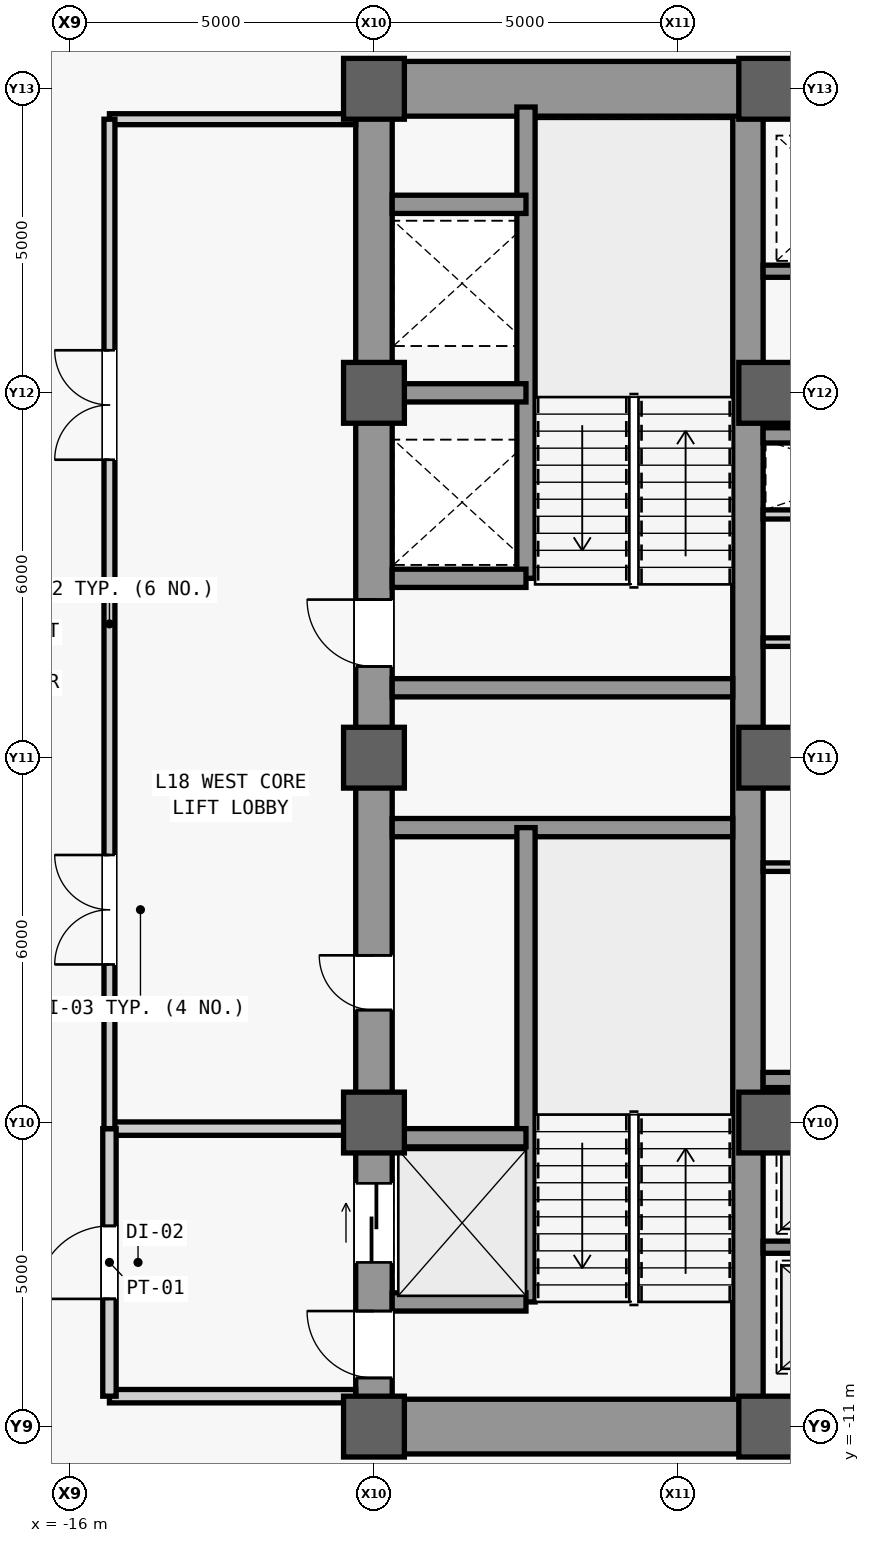
"""IFC4 building model, lengths in metres.
Left out: names, types, materials, properties, quantities, classifications, styles, units other than length and angle.
Written with IfcOpenShell. Run it as: python <this file> out.ifc"""

import sys

from ifc_helpers import new_model, si_unit, direction, frame, frame_2d, origin, origin_2d, place, context, subcontext, project, spatial, rectangle, extrude, source, transform, mapped, element, fill, save


model = new_model("IFC4")
c1 = context("Model", 3, precision=1e-05, world=origin(), true_north=direction((0.0, 1.0)))
c2 = subcontext(c1, "Body", "Model", "MODEL_VIEW")
j1 = project(units=[si_unit("LENGTHUNIT", "METRE"), si_unit("PLANEANGLEUNIT", "RADIAN")], contexts=[c1])
p1 = place(None, origin())
s1 = spatial("IfcSite", under=j1, at=p1, CompositionType="ELEMENT")
p2 = place(p1, origin())
s2 = spatial("IfcBuilding", under=s1, at=p2, CompositionType="ELEMENT")
p3 = place(p2, frame((0.0, 0.0, 83.0)))
s3 = spatial("IfcBuildingStorey", under=s2, at=p3, CompositionType="ELEMENT", Elevation=83.0)
m1 = source(origin(), c2, "Body", "SweptSolid", [
    extrude(rectangle(XDim=22.0, YDim=0.6, at=frame_2d((11.0, 0.0))), origin(), (0.0, 0.0, 1.0), 3.94),
])
p4 = place(p3, frame((-11.0, -11.0, 0.0), z_axis=(0.0, 0.0, 1.0), x_axis=(0.0, 1.0, 0.0)))
e1 = element("IfcWall", 1, at=p4, inside=s3, PredefinedType="SHEAR", context=c2, shape_type="MappedRepresentation", body=[
    mapped(m1, transform((0.0, 0.0, 0.0), scale=1.0)),
])
m2 = source(origin(), c2, "Body", "SweptSolid", [
    extrude(rectangle(XDim=1.1, YDim=2.2, at=frame_2d((0.55, 1.1))), frame((0.0, 0.31, 0.0), z_axis=(0.0, -1.0, 0.0), x_axis=(1.0, 0.0, 0.0)), (0.0, 0.0, 1.0), 0.62),
])
p5 = place(p4, frame((0.8, 0.0, 0.0)))
e2 = element("IfcOpeningElement", 2, at=p5, cuts=e1, PredefinedType="OPENING", context=c2, shape_type="MappedRepresentation", body=[
    mapped(m2, transform((0.0, 0.0, 0.0), scale=1.0)),
])
p6 = place(p4, frame((12.5, 0.0, 0.0)))
e3 = element("IfcOpeningElement", 3, at=p6, cuts=e1, PredefinedType="OPENING", context=c2, shape_type="MappedRepresentation", body=[
    mapped(m2, transform((0.0, 0.0, 0.0), scale=1.0)),
])
m3 = source(origin(), c2, "Body", "SweptSolid", [
    extrude(rectangle(XDim=0.9, YDim=2.15, at=frame_2d((0.45, 1.075))), frame((0.0, 0.31, 0.0), z_axis=(0.0, -1.0, 0.0), x_axis=(1.0, 0.0, 0.0)), (0.0, 0.0, 1.0), 0.62),
])
p7 = place(p4, frame((6.85, 0.0, 0.0)))
e4 = element("IfcOpeningElement", 4, at=p7, cuts=e1, PredefinedType="OPENING", context=c2, shape_type="MappedRepresentation", body=[
    mapped(m3, transform((0.0, 0.0, 0.0), scale=1.0)),
])
m4 = source(origin(), c2, "Body", "SweptSolid", [
    extrude(rectangle(XDim=1.3, YDim=2.3, at=frame_2d((0.65, 1.15))), frame((0.0, 0.31, 0.0), z_axis=(0.0, -1.0, 0.0), x_axis=(1.0, 0.0, 0.0)), (0.0, 0.0, 1.0), 0.62),
])
p8 = place(p4, frame((2.7, 0.0, 0.0)))
e5 = element("IfcOpeningElement", 5, at=p8, cuts=e1, PredefinedType="OPENING", context=c2, shape_type="MappedRepresentation", body=[
    mapped(m4, transform((0.0, 0.0, 0.0), scale=1.0)),
])
m5 = source(origin(), c2, "Body", "SweptSolid", [
    extrude(rectangle(XDim=21.4, YDim=0.5, at=frame_2d((10.7, 0.0))), origin(), (0.0, 0.0, 1.0), 3.94),
])
p9 = place(p3, frame((-4.85, -10.7, 0.0), z_axis=(0.0, 0.0, 1.0), x_axis=(0.0, 1.0, 0.0)))
e6 = element("IfcWall", 6, at=p9, inside=s3, PredefinedType="SHEAR", context=c2, shape_type="MappedRepresentation", body=[
    mapped(m5, transform((0.0, 0.0, 0.0), scale=1.0)),
])
m6 = source(origin(), c2, "Body", "SweptSolid", [
    extrude(rectangle(XDim=5.85, YDim=0.9, at=frame_2d((2.925, 0.0))), origin(), (0.0, 0.0, 1.0), 3.94),
])
for number, where, z_axis, x_axis in (
    (7, (-10.7, -11.0, 0.0), (0.0, 0.0, 1.0), (1.0, 0.0, 0.0)),
    (8, (-10.7, 11.0, 0.0), (0.0, 0.0, 1.0), (1.0, 0.0, 0.0)),
):
    element("IfcWall", number, at=place(p3, frame(where, z_axis=z_axis, x_axis=x_axis)), inside=s3, PredefinedType="SHEAR", context=c2, shape_type="MappedRepresentation", body=[
        mapped(m6, transform((0.0, 0.0, 0.0), scale=1.0)),
    ])
m7 = source(origin(), c2, "Body", "SweptSolid", [
    extrude(rectangle(XDim=5.6, YDim=0.3, at=frame_2d((2.8, 0.0))), origin(), (0.0, 0.0, 1.0), 3.94),
])
for number, where, z_axis, x_axis in (
    (9, (-10.7, -1.15, 0.0), (0.0, 0.0, 1.0), (1.0, 0.0, 0.0)),
    (10, (-10.7, 1.15, 0.0), (0.0, 0.0, 1.0), (1.0, 0.0, 0.0)),
):
    element("IfcWall", number, at=place(p3, frame(where, z_axis=z_axis, x_axis=x_axis)), inside=s3, PredefinedType="SHEAR", context=c2, shape_type="MappedRepresentation", body=[
        mapped(m7, transform((0.0, 0.0, 0.0), scale=1.0)),
    ])
m8 = source(origin(), c2, "Body", "SweptSolid", [
    extrude(rectangle(XDim=9.2, YDim=0.5, at=frame_2d((4.6, 0.0))), origin(), (0.0, 0.0, 1.0), 3.94),
])
p10 = place(p3, frame((-4.6, -11.0, 0.0), z_axis=(0.0, 0.0, 1.0), x_axis=(1.0, 0.0, 0.0)))
e11 = element("IfcWall", 11, at=p10, inside=s3, PredefinedType="SHEAR", context=c2, shape_type="MappedRepresentation", body=[
    mapped(m8, transform((0.0, 0.0, 0.0), scale=1.0)),
])
m9 = source(origin(), c2, "Body", "SweptSolid", [
    extrude(rectangle(XDim=1.8, YDim=2.25, at=frame_2d((0.9, 1.125))), frame((0.0, 0.26, 0.0), z_axis=(0.0, -1.0, 0.0), x_axis=(1.0, 0.0, 0.0)), (0.0, 0.0, 1.0), 0.52),
])
p11 = place(p10, frame((3.7, 0.0, 0.0)))
e12 = element("IfcOpeningElement", 12, at=p11, cuts=e11, PredefinedType="OPENING", context=c2, shape_type="MappedRepresentation", body=[
    mapped(m9, transform((0.0, 0.0, 0.0), scale=1.0)),
])
p12 = place(p3, frame((-4.6, 11.0, 0.0), z_axis=(0.0, 0.0, 1.0), x_axis=(1.0, 0.0, 0.0)))
e13 = element("IfcWall", 13, at=p12, inside=s3, PredefinedType="SHEAR", context=c2, shape_type="MappedRepresentation", body=[
    mapped(m8, transform((0.0, 0.0, 0.0), scale=1.0)),
])
p13 = place(p12, frame((3.7, 0.0, 0.0)))
e14 = element("IfcOpeningElement", 14, at=p13, cuts=e13, PredefinedType="OPENING", context=c2, shape_type="MappedRepresentation", body=[
    mapped(m9, transform((0.0, 0.0, 0.0), scale=1.0)),
])
m10 = source(origin(), c2, "Body", "SweptSolid", [
    extrude(rectangle(XDim=1.0, YDim=1.0, at=origin_2d()), origin(), (0.0, 0.0, 1.0), 4.2),
])
for number, where, z_axis, x_axis in (
    (15, (-11.0, -11.0, 0.0), (0.0, 0.0, 1.0), (1.0, 0.0, 0.0)),
    (16, (-11.0, -6.0, 0.0), (0.0, 0.0, 1.0), (1.0, 0.0, 0.0)),
    (17, (-11.0, 0.0, 0.0), (0.0, 0.0, 1.0), (1.0, 0.0, 0.0)),
    (18, (-11.0, 6.0, 0.0), (0.0, 0.0, 1.0), (1.0, 0.0, 0.0)),
    (19, (-11.0, 11.0, 0.0), (0.0, 0.0, 1.0), (1.0, 0.0, 0.0)),
    (20, (-4.5, -11.0, 0.0), (0.0, 0.0, 1.0), (1.0, 0.0, 0.0)),
    (21, (-4.5, -6.0, 0.0), (0.0, 0.0, 1.0), (1.0, 0.0, 0.0)),
    (22, (-4.5, 0.0, 0.0), (0.0, 0.0, 1.0), (1.0, 0.0, 0.0)),
    (23, (-4.5, 6.0, 0.0), (0.0, 0.0, 1.0), (1.0, 0.0, 0.0)),
    (24, (-4.5, 11.0, 0.0), (0.0, 0.0, 1.0), (1.0, 0.0, 0.0)),
):
    element("IfcColumn", number, at=place(p3, frame(where, z_axis=z_axis, x_axis=x_axis)), inside=s3, PredefinedType="COLUMN", context=c2, shape_type="MappedRepresentation", body=[
        mapped(m10, transform((0.0, 0.0, 0.0), scale=1.0)),
    ])
m11 = source(origin(), c2, "Body", "SweptSolid", [
    extrude(rectangle(XDim=7.8, YDim=0.3, at=frame_2d((3.9, 0.0))), origin(), (0.0, 0.0, 1.0), 3.94),
])
p14 = place(p3, frame((-8.5, -8.95, 0.0), z_axis=(0.0, 0.0, 1.0), x_axis=(0.0, 1.0, 0.0)))
e25 = element("IfcWall", 25, at=p14, inside=s3, PredefinedType="SHEAR", context=c2, shape_type="MappedRepresentation", body=[
    mapped(m11, transform((0.0, 0.0, 0.0), scale=1.0)),
])
m12 = source(origin(), c2, "Body", "SweptSolid", [
    extrude(rectangle(XDim=2.2, YDim=0.3, at=frame_2d((1.1, 0.0))), origin(), (0.0, 0.0, 1.0), 3.94),
])
for number, where, z_axis, x_axis in (
    (26, (-10.7, -8.95, 0.0), (0.0, 0.0, 1.0), (1.0, 0.0, 0.0)),
    (27, (-10.7, -6.25, 0.0), (0.0, 0.0, 1.0), (1.0, 0.0, 0.0)),
):
    element("IfcWall", number, at=place(p3, frame(where, z_axis=z_axis, x_axis=x_axis)), inside=s3, PredefinedType="SHEAR", context=c2, shape_type="MappedRepresentation", body=[
        mapped(m12, transform((0.0, 0.0, 0.0), scale=1.0)),
    ])
m13 = source(origin(), c2, "Body", "SweptSolid", [
    extrude(rectangle(XDim=7.75, YDim=0.3, at=frame_2d((3.875, 0.0))), origin(), (0.0, 0.0, 1.0), 3.94),
])
p15 = place(p3, frame((-8.5, 2.95, 0.0), z_axis=(0.0, 0.0, 1.0), x_axis=(0.0, 1.0, 0.0)))
e28 = element("IfcWall", 28, at=p15, inside=s3, PredefinedType="SHEAR", context=c2, shape_type="MappedRepresentation", body=[
    mapped(m13, transform((0.0, 0.0, 0.0), scale=1.0)),
])
for number, where, z_axis, x_axis in (
    (29, (-10.7, 2.95, 0.0), (0.0, 0.0, 1.0), (1.0, 0.0, 0.0)),
    (30, (-10.7, 6.0, 0.0), (0.0, 0.0, 1.0), (1.0, 0.0, 0.0)),
    (31, (-10.7, 9.1, 0.0), (0.0, 0.0, 1.0), (1.0, 0.0, 0.0)),
):
    element("IfcWall", number, at=place(p3, frame(where, z_axis=z_axis, x_axis=x_axis)), inside=s3, PredefinedType="SHEAR", context=c2, shape_type="MappedRepresentation", body=[
        mapped(m12, transform((0.0, 0.0, 0.0), scale=1.0)),
    ])
m14 = source(origin(), c2, "Body", "SweptSolid", [
    extrude(rectangle(XDim=4.05, YDim=0.22, at=frame_2d((2.025, 0.0))), origin(), (0.0, 0.0, 1.0), 3.94),
])
p16 = place(p3, frame((-15.35, -10.5, 0.0), z_axis=(0.0, 0.0, 1.0), x_axis=(1.0, 0.0, 0.0)))
e32 = element("IfcWall", 32, at=p16, inside=s3, PredefinedType="PARTITIONING", context=c2, shape_type="MappedRepresentation", body=[
    mapped(m14, transform((0.0, 0.0, 0.0), scale=1.0)),
])
m15 = source(origin(), c2, "Body", "SweptSolid", [
    extrude(rectangle(XDim=4.05, YDim=0.22, at=frame_2d((2.025, 0.0))), origin(), (0.0, 0.0, 1.0), 3.085),
])
p17 = place(p3, frame((-15.35, -6.1, 0.0), z_axis=(0.0, 0.0, 1.0), x_axis=(1.0, 0.0, 0.0)))
e33 = element("IfcWall", 33, at=p17, inside=s3, PredefinedType="PARTITIONING", context=c2, shape_type="MappedRepresentation", body=[
    mapped(m15, transform((0.0, 0.0, 0.0), scale=1.0)),
])
m16 = source(origin(), c2, "Body", "SweptSolid", [
    extrude(rectangle(XDim=4.4, YDim=0.22, at=frame_2d((2.2, 0.0))), origin(), (0.0, 0.0, 1.0), 3.94),
])
p18 = place(p3, frame((-15.35, -10.5, 0.0), z_axis=(0.0, 0.0, 1.0), x_axis=(0.0, 1.0, 0.0)))
e34 = element("IfcWall", 34, at=p18, inside=s3, PredefinedType="PARTITIONING", context=c2, shape_type="MappedRepresentation", body=[
    mapped(m16, transform((0.0, 0.0, 0.0), scale=1.0)),
])
m17 = source(origin(), c2, "Body", "SweptSolid", [
    extrude(rectangle(XDim=1.2, YDim=2.2, at=frame_2d((0.6, 1.1))), frame((0.0, 0.12, 0.0), z_axis=(0.0, -1.0, 0.0), x_axis=(1.0, 0.0, 0.0)), (0.0, 0.0, 1.0), 0.24),
])
p19 = place(p18, frame((1.6, 0.0, 0.0)))
e35 = element("IfcOpeningElement", 35, at=p19, cuts=e34, PredefinedType="OPENING", context=c2, shape_type="MappedRepresentation", body=[
    mapped(m17, transform((0.0, 0.0, 0.0), scale=1.0)),
])
m18 = source(origin(), c2, "Body", "SweptSolid", [
    extrude(rectangle(XDim=4.05, YDim=0.18, at=frame_2d((2.025, 0.0))), origin(), (0.0, 0.0, 1.0), 3.94),
])
p20 = place(p3, frame((-15.35, 10.5, 0.0), z_axis=(0.0, 0.0, 1.0), x_axis=(1.0, 0.0, 0.0)))
e36 = element("IfcWall", 36, at=p20, inside=s3, PredefinedType="PARTITIONING", context=c2, shape_type="MappedRepresentation", body=[
    mapped(m18, transform((0.0, 0.0, 0.0), scale=1.0)),
])
m19 = source(origin(), c2, "Body", "SweptSolid", [
    extrude(rectangle(XDim=16.6, YDim=0.18, at=frame_2d((8.3, 0.0))), origin(), (0.0, 0.0, 1.0), 3.94),
])
p21 = place(p3, frame((-15.35, -6.1, 0.0), z_axis=(0.0, 0.0, 1.0), x_axis=(0.0, 1.0, 0.0)))
e37 = element("IfcWall", 37, at=p21, inside=s3, PredefinedType="PARTITIONING", context=c2, shape_type="MappedRepresentation", body=[
    mapped(m19, transform((0.0, 0.0, 0.0), scale=1.0)),
])
m20 = source(origin(), c2, "Body", "SweptSolid", [
    extrude(rectangle(XDim=1.8, YDim=2.25, at=frame_2d((0.9, 1.125))), frame((0.0, 0.1, 0.0), z_axis=(0.0, -1.0, 0.0), x_axis=(1.0, 0.0, 0.0)), (0.0, 0.0, 1.0), 0.2),
])
p22 = place(p21, frame((2.7, 0.0, 0.0)))
e38 = element("IfcOpeningElement", 38, at=p22, cuts=e37, PredefinedType="OPENING", context=c2, shape_type="MappedRepresentation", body=[
    mapped(m20, transform((0.0, 0.0, 0.0), scale=1.0)),
])
p23 = place(p21, frame((11.0, 0.0, 0.0)))
e39 = element("IfcOpeningElement", 39, at=p23, cuts=e37, PredefinedType="OPENING", context=c2, shape_type="MappedRepresentation", body=[
    mapped(m20, transform((0.0, 0.0, 0.0), scale=1.0)),
])
m21 = source(origin(), c2, "Body", "SweptSolid", [
    extrude(rectangle(XDim=3.45, YDim=0.15, at=frame_2d((1.725, 0.0))), origin(), (0.0, 0.0, 1.0), 3.94),
])
p24 = place(p3, frame((-4.6, 4.0, 0.0), z_axis=(0.0, 0.0, 1.0), x_axis=(1.0, 0.0, 0.0)))
e40 = element("IfcWall", 40, at=p24, inside=s3, PredefinedType="PARTITIONING", context=c2, shape_type="MappedRepresentation", body=[
    mapped(m21, transform((0.0, 0.0, 0.0), scale=1.0)),
])
m22 = source(origin(), c2, "Body", "SweptSolid", [
    extrude(rectangle(XDim=2.45, YDim=0.2, at=frame_2d((1.225, 0.0))), origin(), (0.0, 0.0, 1.0), 3.94),
])
p25 = place(p3, frame((-4.6, -8.05, 0.0), z_axis=(0.0, 0.0, 1.0), x_axis=(1.0, 0.0, 0.0)))
e41 = element("IfcWall", 41, at=p25, inside=s3, PredefinedType="SHEAR", context=c2, shape_type="MappedRepresentation", body=[
    mapped(m22, transform((0.0, 0.0, 0.0), scale=1.0)),
])
m23 = source(origin(), c2, "Body", "SweptSolid", [
    extrude(rectangle(XDim=9.2, YDim=0.25, at=frame_2d((4.6, 0.0))), origin(), (0.0, 0.0, 1.0), 3.94),
])
p26 = place(p3, frame((-4.6, -5.3, 0.0), z_axis=(0.0, 0.0, 1.0), x_axis=(1.0, 0.0, 0.0)))
e42 = element("IfcWall", 42, at=p26, inside=s3, PredefinedType="SHEAR", context=c2, shape_type="MappedRepresentation", body=[
    mapped(m23, transform((0.0, 0.0, 0.0), scale=1.0)),
])
m24 = source(origin(), c2, "Body", "SweptSolid", [
    extrude(rectangle(XDim=1.05, YDim=2.2, at=frame_2d((0.525, 1.1))), frame((0.0, 0.135, 0.0), z_axis=(0.0, -1.0, 0.0), x_axis=(1.0, 0.0, 0.0)), (0.0, 0.0, 1.0), 0.27),
])
p27 = place(p26, frame((4.075, 0.0, 0.0)))
e43 = element("IfcOpeningElement", 43, at=p27, cuts=e42, PredefinedType="OPENING", context=c2, shape_type="MappedRepresentation", body=[
    mapped(m24, transform((0.0, 0.0, 0.0), scale=1.0)),
])
p28 = place(p3, frame((-4.6, 8.0, 0.0), z_axis=(0.0, 0.0, 1.0), x_axis=(1.0, 0.0, 0.0)))
e44 = element("IfcWall", 44, at=p28, inside=s3, PredefinedType="SHEAR", context=c2, shape_type="MappedRepresentation", body=[
    mapped(m22, transform((0.0, 0.0, 0.0), scale=1.0)),
])
p29 = place(p3, frame((-4.6, 5.3, 0.0), z_axis=(0.0, 0.0, 1.0), x_axis=(1.0, 0.0, 0.0)))
e45 = element("IfcWall", 45, at=p29, inside=s3, PredefinedType="SHEAR", context=c2, shape_type="MappedRepresentation", body=[
    mapped(m23, transform((0.0, 0.0, 0.0), scale=1.0)),
])
p30 = place(p29, frame((4.075, 0.0, 0.0)))
e46 = element("IfcOpeningElement", 46, at=p30, cuts=e45, PredefinedType="OPENING", context=c2, shape_type="MappedRepresentation", body=[
    mapped(m24, transform((0.0, 0.0, 0.0), scale=1.0)),
])
m25 = source(origin(), c2, "Body", "SweptSolid", [
    extrude(rectangle(XDim=3.45, YDim=0.14, at=frame_2d((1.725, 0.0))), origin(), (0.0, 0.0, 1.0), 3.94),
])
for number, where, z_axis, x_axis in (
    (47, (-4.6, -1.8, 0.0), (0.0, 0.0, 1.0), (1.0, 0.0, 0.0)),
    (48, (-4.6, 1.9, 0.0), (0.0, 0.0, 1.0), (1.0, 0.0, 0.0)),
):
    element("IfcWall", number, at=place(p3, frame(where, z_axis=z_axis, x_axis=x_axis)), inside=s3, PredefinedType="PARTITIONING", context=c2, shape_type="MappedRepresentation", body=[
        mapped(m25, transform((0.0, 0.0, 0.0), scale=1.0)),
    ])
m26 = source(origin(), c2, "Body", "SweptSolid", [
    extrude(rectangle(XDim=1.1, YDim=2.2, at=frame_2d((0.55, 1.1))), frame((0.0, 0.025, 0.0), z_axis=(0.0, -1.0, 0.0), x_axis=(1.0, 0.0, 0.0)), (0.0, 0.0, 1.0), 0.05),
])
p31 = place(p5, origin())
e49 = element("IfcDoor", 49, at=p31, inside=s3, OperationType="SINGLE_SWING_RIGHT", PredefinedType="DOOR", context=c2, shape_type="MappedRepresentation", body=[
    mapped(m26, transform((0.0, 0.0, 0.0), scale=1.0)),
])
fill(e2, e49)
p32 = place(p6, origin())
e50 = element("IfcDoor", 50, at=p32, inside=s3, OperationType="SINGLE_SWING_RIGHT", PredefinedType="DOOR", context=c2, shape_type="MappedRepresentation", body=[
    mapped(m26, transform((0.0, 0.0, 0.0), scale=1.0)),
])
fill(e3, e50)
m27 = source(origin(), c2, "Body", "SweptSolid", [
    extrude(rectangle(XDim=0.9, YDim=2.15, at=frame_2d((0.45, 1.075))), frame((0.0, 0.025, 0.0), z_axis=(0.0, -1.0, 0.0), x_axis=(1.0, 0.0, 0.0)), (0.0, 0.0, 1.0), 0.05),
])
p33 = place(p7, origin())
e51 = element("IfcDoor", 51, at=p33, inside=s3, OperationType="SINGLE_SWING_RIGHT", PredefinedType="DOOR", context=c2, shape_type="MappedRepresentation", body=[
    mapped(m27, transform((0.0, 0.0, 0.0), scale=1.0)),
])
fill(e4, e51)
m28 = source(origin(), c2, "Body", "SweptSolid", [
    extrude(rectangle(XDim=1.2, YDim=2.2, at=frame_2d((0.6, 1.1))), frame((0.0, 0.025, 0.0), z_axis=(0.0, -1.0, 0.0), x_axis=(1.0, 0.0, 0.0)), (0.0, 0.0, 1.0), 0.05),
])
p34 = place(p19, origin())
e52 = element("IfcDoor", 52, at=p34, inside=s3, OperationType="SINGLE_SWING_LEFT", PredefinedType="DOOR", context=c2, shape_type="MappedRepresentation", body=[
    mapped(m28, transform((0.0, 0.0, 0.0), scale=1.0)),
])
fill(e35, e52)
m29 = source(origin(), c2, "Body", "SweptSolid", [
    extrude(rectangle(XDim=1.8, YDim=2.25, at=frame_2d((0.9, 1.125))), frame((0.0, 0.025, 0.0), z_axis=(0.0, -1.0, 0.0), x_axis=(1.0, 0.0, 0.0)), (0.0, 0.0, 1.0), 0.05),
])
p35 = place(p22, origin())
e53 = element("IfcDoor", 53, at=p35, inside=s3, OperationType="SINGLE_SWING_LEFT", PredefinedType="DOOR", context=c2, shape_type="MappedRepresentation", body=[
    mapped(m29, transform((0.0, 0.0, 0.0), scale=1.0)),
])
fill(e38, e53)
p36 = place(p23, origin())
e54 = element("IfcDoor", 54, at=p36, inside=s3, OperationType="SINGLE_SWING_RIGHT", PredefinedType="DOOR", context=c2, shape_type="MappedRepresentation", body=[
    mapped(m29, transform((0.0, 0.0, 0.0), scale=1.0)),
])
fill(e39, e54)
m30 = source(origin(), c2, "Body", "SweptSolid", [
    extrude(rectangle(XDim=1.3, YDim=2.3, at=frame_2d((0.65, 1.15))), frame((0.0, 0.025, 0.0), z_axis=(0.0, -1.0, 0.0), x_axis=(1.0, 0.0, 0.0)), (0.0, 0.0, 1.0), 0.05),
])
p37 = place(p8, origin())
e55 = element("IfcDoor", 55, at=p37, inside=s3, OperationType="SLIDING_TO_LEFT", PredefinedType="DOOR", context=c2, shape_type="MappedRepresentation", body=[
    mapped(m30, transform((0.0, 0.0, 0.0), scale=1.0)),
])
fill(e5, e55)
save(model, sys.argv[1])
